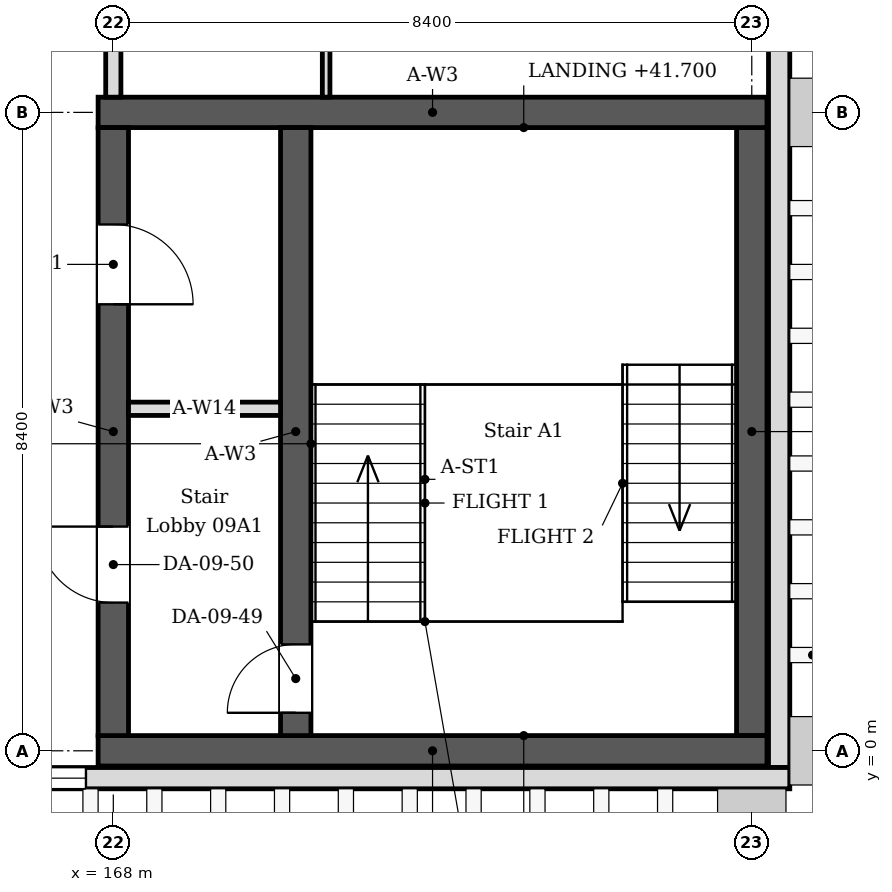
"""IFC4 building model, lengths in metres.
Left out: names, types, materials, properties, quantities, classifications, styles, units other than length and angle.
Written with IfcOpenShell. Run it as: python <this file> out.ifc"""

import sys

from ifc_helpers import new_model, si_unit, direction, frame, frame_2d, origin, place, context, subcontext, project, spatial, rectangle, extrude, element, fill, save


model = new_model("IFC4")
c1 = context("Model", 3, precision=1e-05, world=origin(), true_north=direction((0.0, 1.0)))
c2 = subcontext(c1, "Body", "Model", "MODEL_VIEW")
j1 = project(units=[si_unit("LENGTHUNIT", "METRE"), si_unit("PLANEANGLEUNIT", "RADIAN")], contexts=[c1])
p1 = place(None, origin())
s1 = spatial("IfcSite", under=j1, at=p1, CompositionType="ELEMENT")
p2 = place(p1, origin())
s2 = spatial("IfcBuilding", under=s1, at=p2, CompositionType="ELEMENT")
p3 = place(p2, frame((0.0, 0.0, 39.6)))
s3 = spatial("IfcBuildingStorey", under=s2, at=p3, CompositionType="ELEMENT", Elevation=39.6)
for number, where, z_axis, x_axis in (
    (1, (167.8, 0.0, 0.0), (0.0, 0.0, 1.0), (1.0, 0.0, 0.0)),
    (2, (167.8, 8.4, 0.0), (0.0, 0.0, 1.0), (1.0, 0.0, 0.0)),
):
    element("IfcWall", number, at=place(p3, frame(where, z_axis=z_axis, x_axis=x_axis)), inside=s3, PredefinedType="SOLIDWALL", context=c2, shape_type="SweptSolid", body=[
        extrude(rectangle(XDim=8.8, YDim=0.4, at=frame_2d((4.4, 0.0))), origin(), (0.0, 0.0, 1.0), 4.05),
    ])
p4 = place(p3, frame((168.0, 0.2, 0.0), z_axis=(0.0, 0.0, 1.0), x_axis=(0.0, 1.0, 0.0)))
e3 = element("IfcWall", 3, at=p4, inside=s3, PredefinedType="SOLIDWALL", context=c2, shape_type="SweptSolid", body=[
    extrude(rectangle(XDim=8.0, YDim=0.4, at=frame_2d((4.0, 0.0))), origin(), (0.0, 0.0, 1.0), 4.05),
])
p5 = place(p4, frame((1.75, 0.0, 0.0)))
e4 = element("IfcOpeningElement", 4, at=p5, cuts=e3, PredefinedType="OPENING", context=c2, shape_type="SweptSolid", body=[
    extrude(rectangle(XDim=1.0, YDim=2.1, at=frame_2d((0.5, 1.05))), frame((0.0, 0.21, 0.0), z_axis=(0.0, -1.0, 0.0), x_axis=(1.0, 0.0, 0.0)), (0.0, 0.0, 1.0), 0.42),
])
p6 = place(p4, frame((5.675, 0.0, 0.0)))
e5 = element("IfcOpeningElement", 5, at=p6, cuts=e3, PredefinedType="OPENING", context=c2, shape_type="SweptSolid", body=[
    extrude(rectangle(XDim=1.05, YDim=2.1, at=frame_2d((0.525, 1.05))), frame((0.0, 0.21, 0.0), z_axis=(0.0, -1.0, 0.0), x_axis=(1.0, 0.0, 0.0)), (0.0, 0.0, 1.0), 0.42),
])
p7 = place(p3, frame((176.4, 0.2, 0.0), z_axis=(0.0, 0.0, 1.0), x_axis=(0.0, 1.0, 0.0)))
e6 = element("IfcWall", 6, at=p7, inside=s3, PredefinedType="SOLIDWALL", context=c2, shape_type="SweptSolid", body=[
    extrude(rectangle(XDim=8.0, YDim=0.4, at=frame_2d((4.0, 0.0))), origin(), (0.0, 0.0, 1.0), 4.05),
])
p8 = place(p3, frame((176.76, -0.22, 0.0), z_axis=(0.0, 0.0, 1.0), x_axis=(0.0, 1.0, 0.0)))
e7 = element("IfcWall", 7, at=p8, inside=s3, PredefinedType="SOLIDWALL", context=c2, shape_type="SweptSolid", body=[
    extrude(rectangle(XDim=42.57, YDim=0.28, at=frame_2d((21.285, 0.0))), origin(), (0.0, 0.0, 1.0), 4.05),
])
p9 = place(p8, frame((9.88, 0.0, 0.6)))
e8 = element("IfcOpeningElement", 8, at=p9, cuts=e7, PredefinedType="OPENING", context=c2, shape_type="SweptSolid", body=[
    extrude(rectangle(XDim=2.52, YDim=2.4, at=frame_2d((1.26, 1.2))), frame((0.0, 0.15, 0.0), z_axis=(0.0, -1.0, 0.0), x_axis=(1.0, 0.0, 0.0)), (0.0, 0.0, 1.0), 0.3),
])
p10 = place(p8, frame((14.08, 0.0, 0.6)))
e9 = element("IfcOpeningElement", 9, at=p10, cuts=e7, PredefinedType="OPENING", context=c2, shape_type="SweptSolid", body=[
    extrude(rectangle(XDim=2.52, YDim=2.4, at=frame_2d((1.26, 1.2))), frame((0.0, 0.15, 0.0), z_axis=(0.0, -1.0, 0.0), x_axis=(1.0, 0.0, 0.0)), (0.0, 0.0, 1.0), 0.3),
])
p11 = place(p8, frame((17.86, 0.0, 0.6)))
e10 = element("IfcOpeningElement", 10, at=p11, cuts=e7, PredefinedType="OPENING", context=c2, shape_type="SweptSolid", body=[
    extrude(rectangle(XDim=2.52, YDim=2.4, at=frame_2d((1.26, 1.2))), frame((0.0, 0.15, 0.0), z_axis=(0.0, -1.0, 0.0), x_axis=(1.0, 0.0, 0.0)), (0.0, 0.0, 1.0), 0.3),
])
p12 = place(p8, frame((22.06, 0.0, 0.6)))
e11 = element("IfcOpeningElement", 11, at=p12, cuts=e7, PredefinedType="OPENING", context=c2, shape_type="SweptSolid", body=[
    extrude(rectangle(XDim=2.52, YDim=2.4, at=frame_2d((1.26, 1.2))), frame((0.0, 0.15, 0.0), z_axis=(0.0, -1.0, 0.0), x_axis=(1.0, 0.0, 0.0)), (0.0, 0.0, 1.0), 0.3),
])
p13 = place(p3, frame((156.7, -0.36, 0.0), z_axis=(0.0, 0.0, 1.0), x_axis=(1.0, 0.0, 0.0)))
e12 = element("IfcWall", 12, at=p13, inside=s3, PredefinedType="SOLIDWALL", context=c2, shape_type="SweptSolid", body=[
    extrude(rectangle(XDim=20.2, YDim=0.28, at=frame_2d((10.1, 0.0))), origin(), (0.0, 0.0, 1.0), 4.05),
])
p14 = place(p13, frame((9.26, 0.0, 0.6)))
e13 = element("IfcOpeningElement", 13, at=p14, cuts=e12, PredefinedType="OPENING", context=c2, shape_type="SweptSolid", body=[
    extrude(rectangle(XDim=1.68, YDim=2.4, at=frame_2d((0.84, 1.2))), frame((0.0, 0.15, 0.0), z_axis=(0.0, -1.0, 0.0), x_axis=(1.0, 0.0, 0.0)), (0.0, 0.0, 1.0), 0.3),
])
p15 = place(p13, frame((3.34, 0.0, 0.6)))
e14 = element("IfcOpeningElement", 14, at=p15, cuts=e12, PredefinedType="OPENING", context=c2, shape_type="SweptSolid", body=[
    extrude(rectangle(XDim=2.52, YDim=2.4, at=frame_2d((1.26, 1.2))), frame((0.0, 0.15, 0.0), z_axis=(0.0, -1.0, 0.0), x_axis=(1.0, 0.0, 0.0)), (0.0, 0.0, 1.0), 0.3),
])
p16 = place(p3, frame((170.8, 8.6, 0.0), z_axis=(0.0, 0.0, 1.0), x_axis=(0.0, 1.0, 0.0)))
e15 = element("IfcWall", 15, at=p16, inside=s3, PredefinedType="PARTITIONING", context=c2, shape_type="SweptSolid", body=[
    extrude(rectangle(XDim=2.2, YDim=0.1, at=frame_2d((1.1, 0.0))), origin(), (0.0, 0.0, 1.0), 4.05),
])
p17 = place(p3, frame((168.0, 8.6, 0.0), z_axis=(0.0, 0.0, 1.0), x_axis=(0.0, 1.0, 0.0)))
e16 = element("IfcWall", 16, at=p17, inside=s3, PredefinedType="PARTITIONING", context=c2, shape_type="SweptSolid", body=[
    extrude(rectangle(XDim=8.025, YDim=0.2, at=frame_2d((4.012, 0.0))), origin(), (0.0, 0.0, 1.0), 3.45),
])
p18 = place(p17, frame((3.07, 0.0, 0.0)))
e17 = element("IfcOpeningElement", 17, at=p18, cuts=e16, PredefinedType="OPENING", context=c2, shape_type="SweptSolid", body=[
    extrude(rectangle(XDim=0.9, YDim=2.1, at=frame_2d((0.45, 1.05))), frame((0.0, 0.11, 0.0), z_axis=(0.0, -1.0, 0.0), x_axis=(1.0, 0.0, 0.0)), (0.0, 0.0, 1.0), 0.22),
])
p19 = place(p17, frame((5.07, 0.0, 0.0)))
e18 = element("IfcOpeningElement", 18, at=p19, cuts=e16, PredefinedType="OPENING", context=c2, shape_type="SweptSolid", body=[
    extrude(rectangle(XDim=0.9, YDim=2.1, at=frame_2d((0.45, 1.05))), frame((0.0, 0.11, 0.0), z_axis=(0.0, -1.0, 0.0), x_axis=(1.0, 0.0, 0.0)), (0.0, 0.0, 1.0), 0.22),
])
p20 = place(p3, frame((170.4, 0.2, 0.0), z_axis=(0.0, 0.0, 1.0), x_axis=(0.0, 1.0, 0.0)))
e19 = element("IfcWall", 19, at=p20, inside=s3, PredefinedType="SOLIDWALL", context=c2, shape_type="SweptSolid", body=[
    extrude(rectangle(XDim=8.0, YDim=0.4, at=frame_2d((4.0, 0.0))), origin(), (0.0, 0.0, 1.0), 4.05),
])
p21 = place(p20, frame((0.3, 0.0, 0.0)))
e20 = element("IfcOpeningElement", 20, at=p21, cuts=e19, PredefinedType="OPENING", context=c2, shape_type="SweptSolid", body=[
    extrude(rectangle(XDim=0.9, YDim=2.1, at=frame_2d((0.45, 1.05))), frame((0.0, 0.21, 0.0), z_axis=(0.0, -1.0, 0.0), x_axis=(1.0, 0.0, 0.0)), (0.0, 0.0, 1.0), 0.42),
])
p22 = place(p3, frame((168.2, 4.5, 0.0), z_axis=(0.0, 0.0, 1.0), x_axis=(1.0, 0.0, 0.0)))
e21 = element("IfcWall", 21, at=p22, inside=s3, PredefinedType="PARTITIONING", context=c2, shape_type="SweptSolid", body=[
    extrude(rectangle(XDim=2.0, YDim=0.175, at=frame_2d((1.0, 0.0))), origin(), (0.0, 0.0, 1.0), 4.05),
])
p23 = place(p14, origin())
e22 = element("IfcWindow", 22, at=p23, inside=s3, PartitioningType="SINGLE_PANEL", PredefinedType="WINDOW", context=c2, shape_type="SweptSolid", body=[
    extrude(rectangle(XDim=1.68, YDim=2.4, at=frame_2d((0.84, 1.2))), frame((0.0, 0.03, 0.0), z_axis=(0.0, -1.0, 0.0), x_axis=(1.0, 0.0, 0.0)), (0.0, 0.0, 1.0), 0.06),
])
fill(e13, e22)
p24 = place(p21, origin())
e23 = element("IfcDoor", 23, at=p24, inside=s3, OperationType="SINGLE_SWING_LEFT", PredefinedType="DOOR", context=c2, shape_type="SweptSolid", body=[
    extrude(rectangle(XDim=0.9, YDim=2.1, at=frame_2d((0.45, 1.05))), frame((0.0, 0.025, 0.0), z_axis=(0.0, -1.0, 0.0), x_axis=(1.0, 0.0, 0.0)), (0.0, 0.0, 1.0), 0.05),
])
fill(e20, e23)
p25 = place(p5, origin())
e24 = element("IfcDoor", 24, at=p25, inside=s3, OperationType="SINGLE_SWING_RIGHT", PredefinedType="DOOR", context=c2, shape_type="SweptSolid", body=[
    extrude(rectangle(XDim=1.0, YDim=2.1, at=frame_2d((0.5, 1.05))), frame((0.0, 0.025, 0.0), z_axis=(0.0, -1.0, 0.0), x_axis=(1.0, 0.0, 0.0)), (0.0, 0.0, 1.0), 0.05),
])
fill(e4, e24)
p26 = place(p6, origin())
e25 = element("IfcDoor", 25, at=p26, inside=s3, OperationType="SINGLE_SWING_LEFT", PredefinedType="DOOR", context=c2, shape_type="SweptSolid", body=[
    extrude(rectangle(XDim=1.05, YDim=2.1, at=frame_2d((0.525, 1.05))), frame((0.0, 0.025, 0.0), z_axis=(0.0, -1.0, 0.0), x_axis=(1.0, 0.0, 0.0)), (0.0, 0.0, 1.0), 0.05),
])
fill(e5, e25)
save(model, sys.argv[1])
